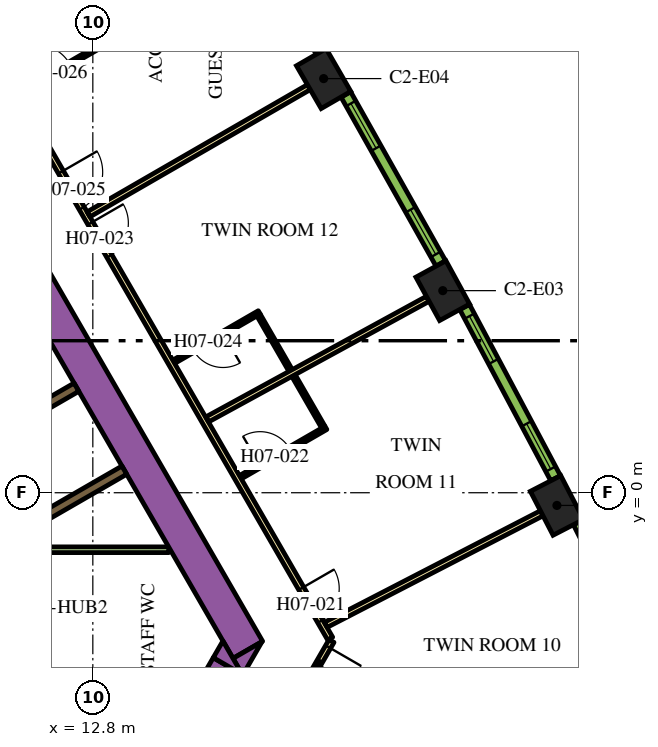
"""IFC4 building model, lengths in metres.
Left out: names, types, materials, properties, quantities, classifications, styles, units other than length and angle.
Written with IfcOpenShell. Run it as: python <this file> out.ifc"""

import sys

from ifc_helpers import new_model, si_unit, direction, frame, frame_2d, origin, origin_2d, place, context, subcontext, project, spatial, polyline, rectangle, outline, extrude, element, fill, save


model = new_model("IFC4")
c1 = context("Model", 3, precision=1e-05, world=origin(), true_north=direction((0.0, 1.0)))
c2 = subcontext(c1, "Body", "Model", "MODEL_VIEW")
j1 = project(units=[si_unit("LENGTHUNIT", "METRE"), si_unit("PLANEANGLEUNIT", "RADIAN")], contexts=[c1])
p1 = place(None, origin())
s1 = spatial("IfcSite", under=j1, at=p1, CompositionType="ELEMENT")
p2 = place(p1, origin())
s2 = spatial("IfcBuilding", under=s1, at=p2, CompositionType="ELEMENT")
p3 = place(p2, frame((0.0, 0.0, 99.3)))
s3 = spatial("IfcBuildingStorey", under=s2, at=p3, CompositionType="ELEMENT", Elevation=99.3)
for number, where, z_axis, x_axis in (
    (1, (25.012, -0.334, 0.0), (0.0, 0.0, 1.0), (-0.459, 0.888, 0.0)),
    (2, (22.009, 5.317, 0.0), (0.0, 0.0, 1.0), (-0.48, 0.877, 0.0)),
    (3, (18.874, 10.897, 0.0), (0.0, 0.0, 1.0), (-0.5, 0.866, 0.0)),
):
    element("IfcColumn", number, at=place(p3, frame(where, z_axis=z_axis, x_axis=x_axis)), inside=s3, PredefinedType="COLUMN", context=c2, shape_type="SweptSolid", body=[
        extrude(rectangle(XDim=1.3, YDim=0.9, at=origin_2d()), origin(), (0.0, 0.0, 1.0), 3.9),
    ])
p4 = place(p3, frame((6.776, 13.364, 0.0), z_axis=(0.0, 0.0, 1.0), x_axis=(0.500004177138, -0.8660229921, 0.0)))
e4 = element("IfcWall", 4, at=p4, inside=s3, PredefinedType="SOLIDWALL", context=c2, shape_type="SweptSolid", body=[
    extrude(rectangle(XDim=20.204, YDim=0.9, at=frame_2d((10.102, 0.0))), origin(), (0.0, 0.0, 1.0), 3.9),
])
p5 = place(p3, origin())
e5 = element("IfcWall", 5, at=p5, inside=s3, PredefinedType="SOLIDWALL", context=c2, shape_type="SweptSolid", body=[
    extrude(outline(polyline([(16.743, -4.8), (16.489, -4.36), (17.251, -3.92), (16.743, -4.8)])), origin(), (0.0, 0.0, 1.0), 3.9),
])
p6 = place(p3, frame((11.695, -12.644, 0.0), z_axis=(0.0, 0.0, 1.0), x_axis=(0.500010229568, 0.86601949766, 0.0)))
e6 = element("IfcWall", 6, at=p6, inside=s3, PredefinedType="SOLIDWALL", context=c2, shape_type="SweptSolid", body=[
    extrude(rectangle(XDim=9.326, YDim=0.9, at=frame_2d((4.663, 0.0))), origin(), (0.0, 0.0, 1.0), 3.9),
])
e7 = element("IfcWall", 7, at=p5, inside=s3, PredefinedType="SOLIDWALL", context=c2, shape_type="SweptSolid", body=[
    extrude(outline(polyline([(16.223, -3.9), (16.732, -4.78), (15.969, -4.34), (16.223, -3.9)])), origin(), (0.0, 0.0, 1.0), 3.9),
])
p7 = place(p3, frame((8.334, -2.964, 0.0), z_axis=(0.0, 0.0, 1.0), x_axis=(0.866016039709, -0.500016218704, 0.0)))
e8 = element("IfcWall", 8, at=p7, inside=s3, PredefinedType="SOLIDWALL", context=c2, shape_type="SweptSolid", body=[
    extrude(rectangle(XDim=7.05, YDim=0.25, at=frame_2d((3.525, 0.0))), origin(), (0.0, 0.0, 1.0), 3.9),
])
p8 = place(p3, frame((10.464, 1.677, 0.0), z_axis=(0.0, 0.0, 1.0), x_axis=(0.86605622881, 0.499946605688, 0.0)))
e9 = element("IfcWall", 9, at=p8, inside=s3, PredefinedType="SOLIDWALL", context=c2, shape_type="SweptSolid", body=[
    extrude(rectangle(XDim=2.2, YDim=0.25, at=frame_2d((1.1, 0.0))), origin(), (0.0, 0.0, 1.0), 3.9),
])
p9 = place(p3, frame((13.629, 0.594, 0.0), z_axis=(0.0, 0.0, 1.0), x_axis=(-0.866063384774, -0.499934209226, 0.0)))
e10 = element("IfcWall", 10, at=p9, inside=s3, PredefinedType="SOLIDWALL", context=c2, shape_type="SweptSolid", body=[
    extrude(rectangle(XDim=2.428, YDim=0.25, at=frame_2d((1.214, 0.0))), origin(), (0.0, 0.0, 1.0), 3.9),
])
p10 = place(p3, frame((10.362, -1.5, 0.0), z_axis=(0.0, 0.0, 1.0), x_axis=(1.0, 0.0, 0.0)))
e11 = element("IfcWall", 11, at=p10, inside=s3, PredefinedType="PARTITIONING", context=c2, shape_type="SweptSolid", body=[
    extrude(rectangle(XDim=4.439, YDim=0.15, at=frame_2d((2.22, 0.0))), origin(), (0.0, 0.0, 1.0), 2.75),
])
p11 = place(p3, frame((19.081, -3.9, 0.0), z_axis=(0.0, 0.0, 1.0), x_axis=(-0.499974327079, -0.866040225545, 0.0)))
e12 = element("IfcWall", 12, at=p11, inside=s3, PredefinedType="PARTITIONING", context=c2, shape_type="SweptSolid", body=[
    extrude(rectangle(XDim=5.258, YDim=0.15, at=frame_2d((2.629, 0.0))), origin(), (0.0, 0.0, 1.0), 2.75),
])
p12 = place(p11, frame((0.18, 0.0, 0.0)))
e13 = element("IfcOpeningElement", 13, at=p12, cuts=e12, PredefinedType="OPENING", context=c2, shape_type="SweptSolid", body=[
    extrude(rectangle(XDim=1.0, YDim=2.1, at=frame_2d((0.5, 1.05))), frame((0.0, 0.085, 0.0), z_axis=(0.0, -1.0, 0.0), x_axis=(1.0, 0.0, 0.0)), (0.0, 0.0, 1.0), 0.17),
])
p13 = place(p3, frame((6.163, 18.475, 0.0), z_axis=(0.0, 0.0, 1.0), x_axis=(0.500001317485, -0.866024643133, 0.0)))
e14 = element("IfcWall", 14, at=p13, inside=s3, PredefinedType="PARTITIONING", context=c2, shape_type="SweptSolid", body=[
    extrude(rectangle(XDim=25.767, YDim=0.15, at=frame_2d((12.883, 0.0))), origin(), (0.0, 0.0, 1.0), 2.75),
])
p14 = place(p13, frame((24.241, 0.0, 0.0)))
e15 = element("IfcOpeningElement", 15, at=p14, cuts=e14, PredefinedType="OPENING", context=c2, shape_type="SweptSolid", body=[
    extrude(rectangle(XDim=1.0, YDim=2.1, at=frame_2d((0.5, 1.05))), frame((0.0, 0.085, 0.0), z_axis=(0.0, -1.0, 0.0), x_axis=(1.0, 0.0, 0.0)), (0.0, 0.0, 1.0), 0.17),
])
p15 = place(p13, frame((13.144, 0.0, 0.0)))
e16 = element("IfcOpeningElement", 16, at=p15, cuts=e14, PredefinedType="OPENING", context=c2, shape_type="SweptSolid", body=[
    extrude(rectangle(XDim=1.0, YDim=2.1, at=frame_2d((0.5, 1.05))), frame((0.0, 0.085, 0.0), z_axis=(0.0, -1.0, 0.0), x_axis=(1.0, 0.0, 0.0)), (0.0, 0.0, 1.0), 0.17),
])
p16 = place(p13, frame((11.592, 0.0, 0.0)))
e17 = element("IfcOpeningElement", 17, at=p16, cuts=e14, PredefinedType="OPENING", context=c2, shape_type="SweptSolid", body=[
    extrude(rectangle(XDim=1.1, YDim=2.1, at=frame_2d((0.55, 1.05))), frame((0.0, 0.085, 0.0), z_axis=(0.0, -1.0, 0.0), x_axis=(1.0, 0.0, 0.0)), (0.0, 0.0, 1.0), 0.17),
])
p17 = place(p13, frame((4.674, 0.0, 0.0)))
e18 = element("IfcOpeningElement", 18, at=p17, cuts=e14, PredefinedType="OPENING", context=c2, shape_type="SweptSolid", body=[
    extrude(rectangle(XDim=0.9, YDim=2.1, at=frame_2d((0.45, 1.05))), frame((0.0, 0.085, 0.0), z_axis=(0.0, -1.0, 0.0), x_axis=(1.0, 0.0, 0.0)), (0.0, 0.0, 1.0), 0.17),
])
p18 = place(p13, frame((2.411, 0.0, 0.0)))
e19 = element("IfcOpeningElement", 19, at=p18, cuts=e14, PredefinedType="OPENING", context=c2, shape_type="SweptSolid", body=[
    extrude(rectangle(XDim=1.0, YDim=2.1, at=frame_2d((0.5, 1.05))), frame((0.0, 0.085, 0.0), z_axis=(0.0, -1.0, 0.0), x_axis=(1.0, 0.0, 0.0)), (0.0, 0.0, 1.0), 0.17),
])
p19 = place(p3, frame((18.484, 10.672, 0.0), z_axis=(0.0, 0.0, 1.0), x_axis=(-0.866019162053, -0.50001081084, 0.0)))
e20 = element("IfcWall", 20, at=p19, inside=s3, PredefinedType="PARTITIONING", context=c2, shape_type="SweptSolid", body=[
    extrude(rectangle(XDim=6.694, YDim=0.15, at=frame_2d((3.347, 0.0))), origin(), (0.0, 0.0, 1.0), 2.75),
])
p20 = place(p3, frame((21.614, 5.102, 0.0), z_axis=(0.0, 0.0, 1.0), x_axis=(-0.877484555087, -0.479604895287, 0.0)))
e21 = element("IfcWall", 21, at=p20, inside=s3, PredefinedType="PARTITIONING", context=c2, shape_type="SweptSolid", body=[
    extrude(rectangle(XDim=6.611, YDim=0.15, at=frame_2d((3.306, 0.0))), origin(), (0.0, 0.0, 1.0), 2.75),
])
p21 = place(p3, frame((24.613, -0.541, 0.0), z_axis=(0.0, 0.0, 1.0), x_axis=(-0.888459912519, -0.458954228487, 0.0)))
e22 = element("IfcWall", 22, at=p21, inside=s3, PredefinedType="PARTITIONING", context=c2, shape_type="SweptSolid", body=[
    extrude(rectangle(XDim=6.392, YDim=0.15, at=frame_2d((3.196, 0.0))), origin(), (0.0, 0.0, 1.0), 2.75),
])
p22 = place(p3, frame((16.681, 0.407, 0.0), z_axis=(0.0, 0.0, 1.0), x_axis=(0.866021400173, 0.500006934395, 0.0)))
e23 = element("IfcWall", 23, at=p22, inside=s3, PredefinedType="PARTITIONING", context=c2, shape_type="SweptSolid", body=[
    extrude(rectangle(XDim=2.6, YDim=0.1, at=frame_2d((1.3, 0.0))), origin(), (0.0, 0.0, 1.0), 2.75),
])
p23 = place(p22, frame((0.6, 0.0, 0.0)))
e24 = element("IfcOpeningElement", 24, at=p23, cuts=e23, PredefinedType="OPENING", context=c2, shape_type="SweptSolid", body=[
    extrude(rectangle(XDim=0.9, YDim=2.1, at=frame_2d((0.45, 1.05))), frame((0.0, 0.06, 0.0), z_axis=(0.0, -1.0, 0.0), x_axis=(1.0, 0.0, 0.0)), (0.0, 0.0, 1.0), 0.12),
])
p24 = place(p3, frame((18.86, 1.734, 0.0), z_axis=(0.0, 0.0, 1.0), x_axis=(-0.500017819788, 0.86601511528, 0.0)))
e25 = element("IfcWall", 25, at=p24, inside=s3, PredefinedType="PARTITIONING", context=c2, shape_type="SweptSolid", body=[
    extrude(rectangle(XDim=1.55, YDim=0.1, at=frame_2d((0.775, 0.0))), origin(), (0.0, 0.0, 1.0), 2.75),
])
p25 = place(p3, frame((17.179, 4.745, 0.0), z_axis=(0.0, 0.0, 1.0), x_axis=(-0.866021400173, -0.500006934395, 0.0)))
e26 = element("IfcWall", 26, at=p25, inside=s3, PredefinedType="PARTITIONING", context=c2, shape_type="SweptSolid", body=[
    extrude(rectangle(XDim=2.6, YDim=0.1, at=frame_2d((1.3, 0.0))), origin(), (0.0, 0.0, 1.0), 2.75),
])
p26 = place(p25, frame((1.1, 0.0, 0.0)))
e27 = element("IfcOpeningElement", 27, at=p26, cuts=e26, PredefinedType="OPENING", context=c2, shape_type="SweptSolid", body=[
    extrude(rectangle(XDim=0.9, YDim=2.1, at=frame_2d((0.45, 1.05))), frame((0.0, 0.06, 0.0), z_axis=(0.0, -1.0, 0.0), x_axis=(1.0, 0.0, 0.0)), (0.0, 0.0, 1.0), 0.12),
])
p27 = place(p3, frame((17.161, 4.677, 0.0), z_axis=(0.0, 0.0, 1.0), x_axis=(0.499890179513, -0.866088799389, 0.0)))
e28 = element("IfcWall", 28, at=p27, inside=s3, PredefinedType="PARTITIONING", context=c2, shape_type="SweptSolid", body=[
    extrude(rectangle(XDim=1.68, YDim=0.1, at=frame_2d((0.84, 0.0))), origin(), (0.0, 0.0, 1.0), 2.75),
])
p28 = place(p3, frame((10.847, 10.513, 0.0), z_axis=(0.0, 0.0, 1.0), x_axis=(0.865996816683, 0.500049511043, 0.0)))
e29 = element("IfcWall", 29, at=p28, inside=s3, PredefinedType="PARTITIONING", context=c2, shape_type="SweptSolid", body=[
    extrude(rectangle(XDim=2.8, YDim=0.1, at=frame_2d((1.4, 0.0))), origin(), (0.0, 0.0, 1.0), 2.75),
])
p29 = place(p28, frame((0.55, 0.0, 0.0)))
e30 = element("IfcOpeningElement", 30, at=p29, cuts=e29, PredefinedType="OPENING", context=c2, shape_type="SweptSolid", body=[
    extrude(rectangle(XDim=1.0, YDim=2.1, at=frame_2d((0.5, 1.05))), frame((0.0, 0.06, 0.0), z_axis=(0.0, -1.0, 0.0), x_axis=(1.0, 0.0, 0.0)), (0.0, 0.0, 1.0), 0.12),
])
p30 = place(p3, frame((27.864, -5.336, 0.0), z_axis=(0.0, 0.0, 1.0), x_axis=(-0.448534297211, 0.893765620409, 0.0)))
e31 = element("IfcWall", 31, at=p30, inside=s3, PredefinedType="SOLIDWALL", context=c2, shape_type="SweptSolid", body=[
    extrude(rectangle(XDim=5.1, YDim=0.29, at=frame_2d((2.55, 0.0))), origin(), (0.0, 0.0, 1.0), 3.65),
])
p31 = place(p30, frame((0.272, 0.0, 0.9)))
e32 = element("IfcOpeningElement", 32, at=p31, cuts=e31, PredefinedType="OPENING", context=c2, shape_type="SweptSolid", body=[
    extrude(rectangle(XDim=1.35, YDim=2.15, at=frame_2d((0.675, 1.075))), frame((0.0, 0.155, 0.0), z_axis=(0.0, -1.0, 0.0), x_axis=(1.0, 0.0, 0.0)), (0.0, 0.0, 1.0), 0.31),
])
p32 = place(p30, frame((3.478, 0.0, 0.9)))
e33 = element("IfcOpeningElement", 33, at=p32, cuts=e31, PredefinedType="OPENING", context=c2, shape_type="SweptSolid", body=[
    extrude(rectangle(XDim=1.35, YDim=2.15, at=frame_2d((0.675, 1.075))), frame((0.0, 0.155, 0.0), z_axis=(0.0, -1.0, 0.0), x_axis=(1.0, 0.0, 0.0)), (0.0, 0.0, 1.0), 0.31),
])
p33 = place(p3, frame((24.977, 0.383, 0.0), z_axis=(0.0, 0.0, 1.0), x_axis=(-0.469323203119, 0.883026461106, 0.0)))
e34 = element("IfcWall", 34, at=p33, inside=s3, PredefinedType="SOLIDWALL", context=c2, shape_type="SweptSolid", body=[
    extrude(rectangle(XDim=5.101, YDim=0.29, at=frame_2d((2.55, 0.0))), origin(), (0.0, 0.0, 1.0), 3.65),
])
p34 = place(p33, frame((0.273, 0.0, 0.9)))
e35 = element("IfcOpeningElement", 35, at=p34, cuts=e34, PredefinedType="OPENING", context=c2, shape_type="SweptSolid", body=[
    extrude(rectangle(XDim=1.35, YDim=2.15, at=frame_2d((0.675, 1.075))), frame((0.0, 0.155, 0.0), z_axis=(0.0, -1.0, 0.0), x_axis=(1.0, 0.0, 0.0)), (0.0, 0.0, 1.0), 0.31),
])
p35 = place(p33, frame((3.478, 0.0, 0.9)))
e36 = element("IfcOpeningElement", 36, at=p35, cuts=e34, PredefinedType="OPENING", context=c2, shape_type="SweptSolid", body=[
    extrude(rectangle(XDim=1.35, YDim=2.15, at=frame_2d((0.675, 1.075))), frame((0.0, 0.155, 0.0), z_axis=(0.0, -1.0, 0.0), x_axis=(1.0, 0.0, 0.0)), (0.0, 0.0, 1.0), 0.31),
])
p36 = place(p3, frame((21.956, 6.033, 0.0), z_axis=(0.0, 0.0, 1.0), x_axis=(-0.48983164787, 0.87181704316, 0.0)))
e37 = element("IfcWall", 37, at=p36, inside=s3, PredefinedType="SOLIDWALL", context=c2, shape_type="SweptSolid", body=[
    extrude(rectangle(XDim=5.1, YDim=0.29, at=frame_2d((2.55, 0.0))), origin(), (0.0, 0.0, 1.0), 3.65),
])
p37 = place(p36, frame((0.273, 0.0, 0.9)))
e38 = element("IfcOpeningElement", 38, at=p37, cuts=e37, PredefinedType="OPENING", context=c2, shape_type="SweptSolid", body=[
    extrude(rectangle(XDim=1.35, YDim=2.15, at=frame_2d((0.675, 1.075))), frame((0.0, 0.155, 0.0), z_axis=(0.0, -1.0, 0.0), x_axis=(1.0, 0.0, 0.0)), (0.0, 0.0, 1.0), 0.31),
])
p38 = place(p36, frame((3.478, 0.0, 0.9)))
e39 = element("IfcOpeningElement", 39, at=p38, cuts=e37, PredefinedType="OPENING", context=c2, shape_type="SweptSolid", body=[
    extrude(rectangle(XDim=1.35, YDim=2.15, at=frame_2d((0.675, 1.075))), frame((0.0, 0.155, 0.0), z_axis=(0.0, -1.0, 0.0), x_axis=(1.0, 0.0, 0.0)), (0.0, 0.0, 1.0), 0.31),
])
p39 = place(p3, frame((18.805, 11.611, 0.0), z_axis=(0.0, 0.0, 1.0), x_axis=(-0.510054281659, 0.860142214847, 0.0)))
e40 = element("IfcWall", 40, at=p39, inside=s3, PredefinedType="SOLIDWALL", context=c2, shape_type="SweptSolid", body=[
    extrude(rectangle(XDim=5.101, YDim=0.29, at=frame_2d((2.55, 0.0))), origin(), (0.0, 0.0, 1.0), 3.65),
])
p40 = place(p39, frame((0.273, 0.0, 0.9)))
e41 = element("IfcOpeningElement", 41, at=p40, cuts=e40, PredefinedType="OPENING", context=c2, shape_type="SweptSolid", body=[
    extrude(rectangle(XDim=1.35, YDim=2.15, at=frame_2d((0.675, 1.075))), frame((0.0, 0.155, 0.0), z_axis=(0.0, -1.0, 0.0), x_axis=(1.0, 0.0, 0.0)), (0.0, 0.0, 1.0), 0.31),
])
p41 = place(p39, frame((3.478, 0.0, 0.9)))
e42 = element("IfcOpeningElement", 42, at=p41, cuts=e40, PredefinedType="OPENING", context=c2, shape_type="SweptSolid", body=[
    extrude(rectangle(XDim=1.35, YDim=2.15, at=frame_2d((0.675, 1.075))), frame((0.0, 0.155, 0.0), z_axis=(0.0, -1.0, 0.0), x_axis=(1.0, 0.0, 0.0)), (0.0, 0.0, 1.0), 0.31),
])
p42 = place(p12, origin())
e43 = element("IfcDoor", 43, at=p42, inside=s3, OperationType="SINGLE_SWING_LEFT", PredefinedType="DOOR", context=c2, shape_type="SweptSolid", body=[
    extrude(rectangle(XDim=1.0, YDim=2.1, at=frame_2d((0.5, 1.05))), frame((0.0, 0.025, 0.0), z_axis=(0.0, -1.0, 0.0), x_axis=(1.0, 0.0, 0.0)), (0.0, 0.0, 1.0), 0.05),
])
fill(e13, e43)
p43 = place(p14, origin())
e44 = element("IfcDoor", 44, at=p43, inside=s3, OperationType="SINGLE_SWING_RIGHT", PredefinedType="DOOR", context=c2, shape_type="SweptSolid", body=[
    extrude(rectangle(XDim=1.0, YDim=2.1, at=frame_2d((0.5, 1.05))), frame((0.0, 0.025, 0.0), z_axis=(0.0, -1.0, 0.0), x_axis=(1.0, 0.0, 0.0)), (0.0, 0.0, 1.0), 0.05),
])
fill(e15, e44)
p44 = place(p23, origin())
e45 = element("IfcDoor", 45, at=p44, inside=s3, OperationType="SINGLE_SWING_LEFT", PredefinedType="DOOR", context=c2, shape_type="SweptSolid", body=[
    extrude(rectangle(XDim=0.9, YDim=2.1, at=frame_2d((0.45, 1.05))), frame((0.0, 0.025, 0.0), z_axis=(0.0, -1.0, 0.0), x_axis=(1.0, 0.0, 0.0)), (0.0, 0.0, 1.0), 0.05),
])
fill(e24, e45)
p45 = place(p15, origin())
e46 = element("IfcDoor", 46, at=p45, inside=s3, OperationType="SINGLE_SWING_LEFT", PredefinedType="DOOR", context=c2, shape_type="SweptSolid", body=[
    extrude(rectangle(XDim=1.0, YDim=2.1, at=frame_2d((0.5, 1.05))), frame((0.0, 0.025, 0.0), z_axis=(0.0, -1.0, 0.0), x_axis=(1.0, 0.0, 0.0)), (0.0, 0.0, 1.0), 0.05),
])
fill(e16, e46)
p46 = place(p26, origin())
e47 = element("IfcDoor", 47, at=p46, inside=s3, OperationType="SINGLE_SWING_RIGHT", PredefinedType="DOOR", context=c2, shape_type="SweptSolid", body=[
    extrude(rectangle(XDim=0.9, YDim=2.1, at=frame_2d((0.45, 1.05))), frame((0.0, 0.025, 0.0), z_axis=(0.0, -1.0, 0.0), x_axis=(1.0, 0.0, 0.0)), (0.0, 0.0, 1.0), 0.05),
])
fill(e27, e47)
p47 = place(p16, origin())
e48 = element("IfcDoor", 48, at=p47, inside=s3, OperationType="SINGLE_SWING_RIGHT", PredefinedType="DOOR", context=c2, shape_type="SweptSolid", body=[
    extrude(rectangle(XDim=1.1, YDim=2.1, at=frame_2d((0.55, 1.05))), frame((0.0, 0.025, 0.0), z_axis=(0.0, -1.0, 0.0), x_axis=(1.0, 0.0, 0.0)), (0.0, 0.0, 1.0), 0.05),
])
fill(e17, e48)
p48 = place(p29, origin())
e49 = element("IfcDoor", 49, at=p48, inside=s3, OperationType="SINGLE_SWING_LEFT", PredefinedType="DOOR", context=c2, shape_type="SweptSolid", body=[
    extrude(rectangle(XDim=1.0, YDim=2.1, at=frame_2d((0.5, 1.05))), frame((0.0, 0.025, 0.0), z_axis=(0.0, -1.0, 0.0), x_axis=(1.0, 0.0, 0.0)), (0.0, 0.0, 1.0), 0.05),
])
fill(e30, e49)
p49 = place(p34, origin())
e50 = element("IfcWindow", 50, at=p49, inside=s3, PartitioningType="DOUBLE_PANEL_VERTICAL", PredefinedType="WINDOW", context=c2, shape_type="SweptSolid", body=[
    extrude(rectangle(XDim=1.35, YDim=2.15, at=frame_2d((0.675, 1.075))), frame((0.0, 0.015, 0.0), z_axis=(0.0, -1.0, 0.0), x_axis=(1.0, 0.0, 0.0)), (0.0, 0.0, 1.0), 0.06),
])
fill(e35, e50)
p50 = place(p35, origin())
e51 = element("IfcWindow", 51, at=p50, inside=s3, PartitioningType="DOUBLE_PANEL_VERTICAL", PredefinedType="WINDOW", context=c2, shape_type="SweptSolid", body=[
    extrude(rectangle(XDim=1.35, YDim=2.15, at=frame_2d((0.675, 1.075))), frame((0.0, 0.015, 0.0), z_axis=(0.0, -1.0, 0.0), x_axis=(1.0, 0.0, 0.0)), (0.0, 0.0, 1.0), 0.06),
])
fill(e36, e51)
p51 = place(p37, origin())
e52 = element("IfcWindow", 52, at=p51, inside=s3, PartitioningType="DOUBLE_PANEL_VERTICAL", PredefinedType="WINDOW", context=c2, shape_type="SweptSolid", body=[
    extrude(rectangle(XDim=1.35, YDim=2.15, at=frame_2d((0.675, 1.075))), frame((0.0, 0.015, 0.0), z_axis=(0.0, -1.0, 0.0), x_axis=(1.0, 0.0, 0.0)), (0.0, 0.0, 1.0), 0.06),
])
fill(e38, e52)
p52 = place(p38, origin())
e53 = element("IfcWindow", 53, at=p52, inside=s3, PartitioningType="DOUBLE_PANEL_VERTICAL", PredefinedType="WINDOW", context=c2, shape_type="SweptSolid", body=[
    extrude(rectangle(XDim=1.35, YDim=2.15, at=frame_2d((0.675, 1.075))), frame((0.0, 0.015, 0.0), z_axis=(0.0, -1.0, 0.0), x_axis=(1.0, 0.0, 0.0)), (0.0, 0.0, 1.0), 0.06),
])
fill(e39, e53)
save(model, sys.argv[1])
